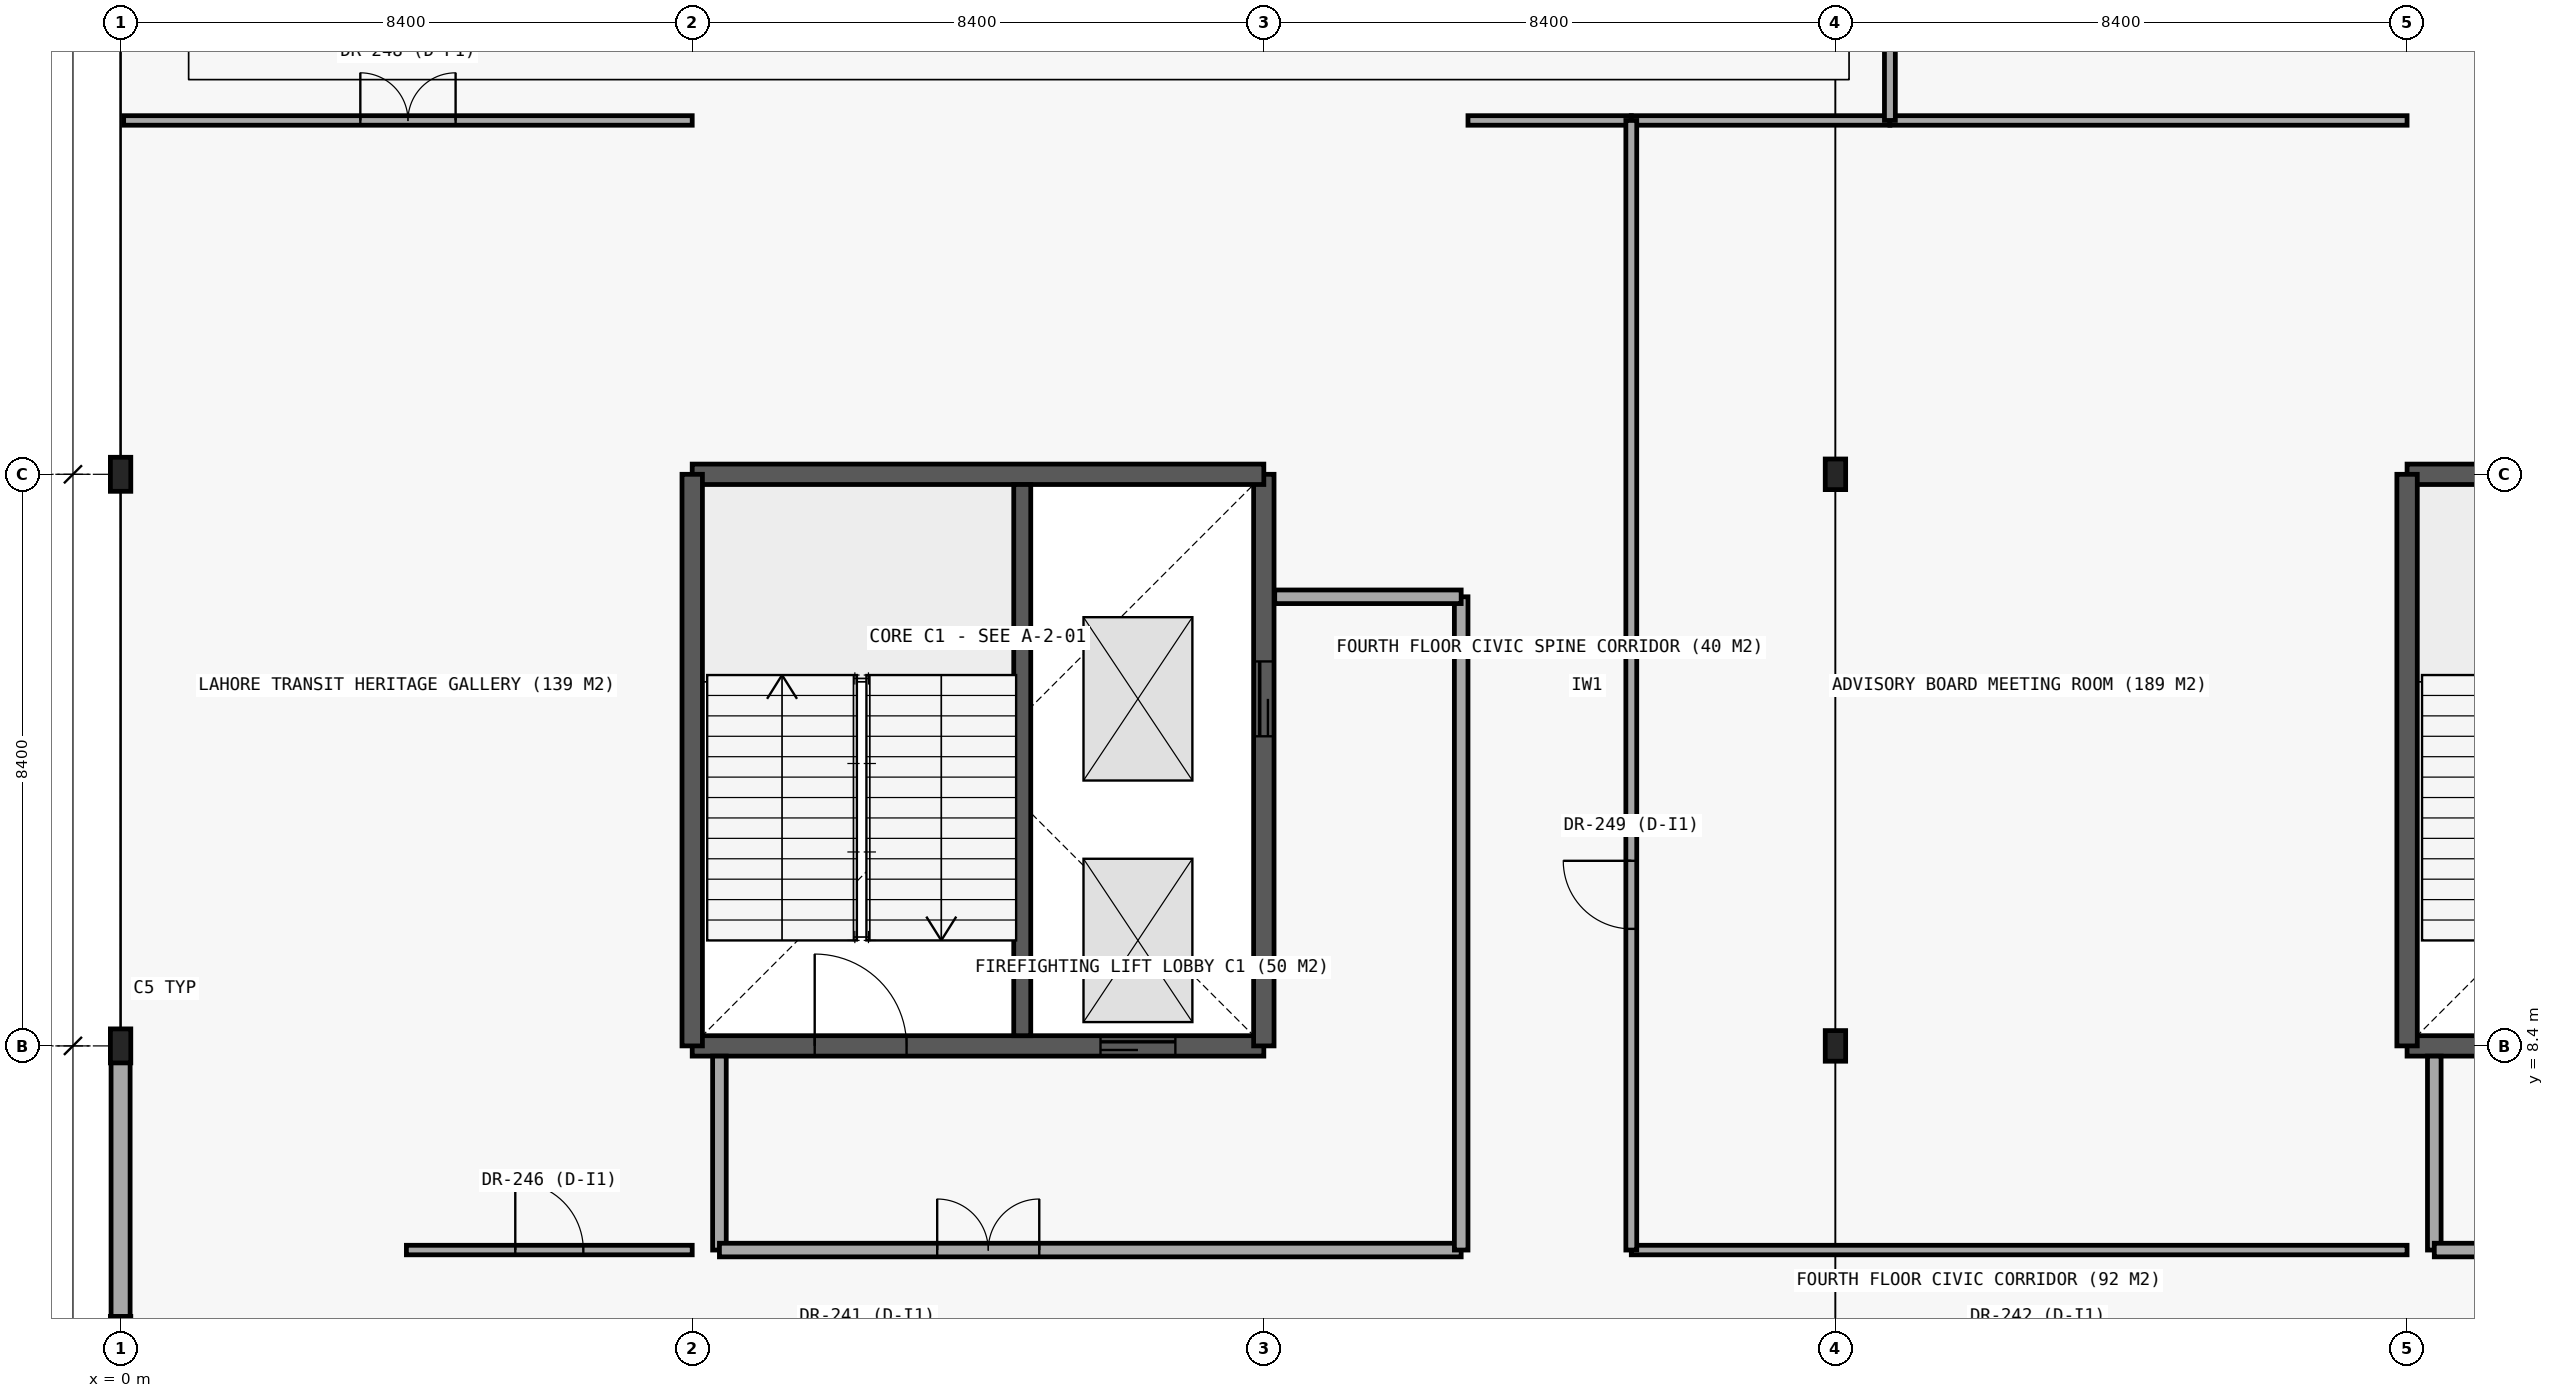
"""IFC4 building model, lengths in metres.
Left out: names, types, materials, properties, quantities, classifications, styles, units other than length and angle.
Written with IfcOpenShell. Run it as: python <this file> out.ifc"""

import sys

from ifc_helpers import new_model, si_unit, direction, frame, frame_2d, origin, origin_2d, place, context, subcontext, project, spatial, rectangle, i_section, extrude, element, fill, save


model = new_model("IFC4")
c1 = context("Model", 3, precision=1e-05, world=origin(), true_north=direction((0.0, 1.0)))
c2 = subcontext(c1, "Body", "Model", "MODEL_VIEW")
j1 = project(units=[si_unit("LENGTHUNIT", "METRE"), si_unit("PLANEANGLEUNIT", "RADIAN")], contexts=[c1])
p1 = place(None, origin())
s1 = spatial("IfcSite", under=j1, at=p1, CompositionType="ELEMENT")
p2 = place(p1, origin())
s2 = spatial("IfcBuilding", under=s1, at=p2, CompositionType="ELEMENT")
p3 = place(p2, frame((0.0, 0.0, 17.4)))
s3 = spatial("IfcBuildingStorey", under=s2, at=p3, CompositionType="ELEMENT", Elevation=17.4)
p4 = place(p3, frame((8.4, 8.4, 0.0), z_axis=(0.0, 0.0, 1.0), x_axis=(1.0, 0.0, 0.0)))
e1 = element("IfcWall", 1, at=p4, inside=s3, PredefinedType="SHEAR", context=c2, shape_type="SweptSolid", body=[
    extrude(rectangle(XDim=8.4, YDim=0.3, at=frame_2d((4.2, 0.0))), origin(), (0.0, 0.0, 1.0), 4.2),
])
p5 = place(p4, frame((1.8, 0.0, 0.0)))
e2 = element("IfcOpeningElement", 2, at=p5, cuts=e1, PredefinedType="OPENING", context=c2, shape_type="SweptSolid", body=[
    extrude(rectangle(XDim=1.35, YDim=2.2, at=frame_2d((0.675, 1.1))), frame((0.0, 0.16, 0.0), z_axis=(0.0, -1.0, 0.0), x_axis=(1.0, 0.0, 0.0)), (0.0, 0.0, 1.0), 0.32),
])
p6 = place(p4, frame((6.0, 0.0, 0.0)))
e3 = element("IfcOpeningElement", 3, at=p6, cuts=e1, PredefinedType="OPENING", context=c2, shape_type="SweptSolid", body=[
    extrude(rectangle(XDim=1.1, YDim=2.2, at=frame_2d((0.55, 1.1))), frame((0.0, 0.16, 0.0), z_axis=(0.0, -1.0, 0.0), x_axis=(1.0, 0.0, 0.0)), (0.0, 0.0, 1.0), 0.32),
])
p7 = place(p3, frame((16.8, 8.4, 0.0), z_axis=(0.0, 0.0, 1.0), x_axis=(0.0, 1.0, 0.0)))
e4 = element("IfcWall", 4, at=p7, inside=s3, PredefinedType="SHEAR", context=c2, shape_type="SweptSolid", body=[
    extrude(rectangle(XDim=8.4, YDim=0.3, at=frame_2d((4.2, 0.0))), origin(), (0.0, 0.0, 1.0), 4.2),
])
p8 = place(p7, frame((4.55, 0.0, 0.0)))
e5 = element("IfcOpeningElement", 5, at=p8, cuts=e4, PredefinedType="OPENING", context=c2, shape_type="SweptSolid", body=[
    extrude(rectangle(XDim=1.1, YDim=2.2, at=frame_2d((0.55, 1.1))), frame((0.0, 0.16, 0.0), z_axis=(0.0, -1.0, 0.0), x_axis=(1.0, 0.0, 0.0)), (0.0, 0.0, 1.0), 0.32),
])
for number, where, z_axis, x_axis in (
    (6, (16.8, 16.8, 0.0), (0.0, 0.0, 1.0), (-1.0, 0.0, 0.0)),
    (7, (8.4, 16.8, 0.0), (0.0, 0.0, 1.0), (0.0, -1.0, 0.0)),
):
    element("IfcWall", number, at=place(p3, frame(where, z_axis=z_axis, x_axis=x_axis)), inside=s3, PredefinedType="SHEAR", context=c2, shape_type="SweptSolid", body=[
        extrude(rectangle(XDim=8.4, YDim=0.3, at=frame_2d((4.2, 0.0))), origin(), (0.0, 0.0, 1.0), 4.2),
    ])
p9 = place(p3, frame((13.25, 8.55, 0.0), z_axis=(0.0, 0.0, 1.0), x_axis=(0.0, 1.0, 0.0)))
e8 = element("IfcWall", 8, at=p9, inside=s3, PredefinedType="SHEAR", context=c2, shape_type="SweptSolid", body=[
    extrude(rectangle(XDim=8.1, YDim=0.25, at=frame_2d((4.05, 0.0))), origin(), (0.0, 0.0, 1.0), 4.2),
])
p10 = place(p3, frame((33.6, 8.4, 0.0), z_axis=(0.0, 0.0, 1.0), x_axis=(1.0, 0.0, 0.0)))
e9 = element("IfcWall", 9, at=p10, inside=s3, PredefinedType="SHEAR", context=c2, shape_type="SweptSolid", body=[
    extrude(rectangle(XDim=8.4, YDim=0.3, at=frame_2d((4.2, 0.0))), origin(), (0.0, 0.0, 1.0), 4.2),
])
p11 = place(p10, frame((1.8, 0.0, 0.0)))
e10 = element("IfcOpeningElement", 10, at=p11, cuts=e9, PredefinedType="OPENING", context=c2, shape_type="SweptSolid", body=[
    extrude(rectangle(XDim=1.35, YDim=2.2, at=frame_2d((0.675, 1.1))), frame((0.0, 0.16, 0.0), z_axis=(0.0, -1.0, 0.0), x_axis=(1.0, 0.0, 0.0)), (0.0, 0.0, 1.0), 0.32),
])
p12 = place(p10, frame((6.0, 0.0, 0.0)))
e11 = element("IfcOpeningElement", 11, at=p12, cuts=e9, PredefinedType="OPENING", context=c2, shape_type="SweptSolid", body=[
    extrude(rectangle(XDim=1.1, YDim=2.2, at=frame_2d((0.55, 1.1))), frame((0.0, 0.16, 0.0), z_axis=(0.0, -1.0, 0.0), x_axis=(1.0, 0.0, 0.0)), (0.0, 0.0, 1.0), 0.32),
])
p13 = place(p3, frame((42.0, 16.8, 0.0), z_axis=(0.0, 0.0, 1.0), x_axis=(-1.0, 0.0, 0.0)))
e12 = element("IfcWall", 12, at=p13, inside=s3, PredefinedType="SHEAR", context=c2, shape_type="SweptSolid", body=[
    extrude(rectangle(XDim=8.4, YDim=0.3, at=frame_2d((4.2, 0.0))), origin(), (0.0, 0.0, 1.0), 4.2),
])
p14 = place(p3, frame((33.6, 16.8, 0.0), z_axis=(0.0, 0.0, 1.0), x_axis=(0.0, -1.0, 0.0)))
e13 = element("IfcWall", 13, at=p14, inside=s3, PredefinedType="SHEAR", context=c2, shape_type="SweptSolid", body=[
    extrude(rectangle(XDim=8.4, YDim=0.3, at=frame_2d((4.2, 0.0))), origin(), (0.0, 0.0, 1.0), 4.2),
])
for number, where, z_axis, x_axis in (
    (14, (0.0, 8.4, 0.0), (0.0, 0.0, 1.0), (1.0, 0.0, 0.0)),
    (15, (0.0, 16.8, 0.0), (0.0, 0.0, 1.0), (1.0, 0.0, 0.0)),
):
    element("IfcColumn", number, at=place(p3, frame(where, z_axis=z_axis, x_axis=x_axis)), inside=s3, PredefinedType="COLUMN", context=c2, shape_type="SweptSolid", body=[
        extrude(i_section(OverallWidth=0.3, OverallDepth=0.5, WebThickness=0.014, FlangeThickness=0.028, FilletRadius=0.027, at=origin_2d()), origin(), (0.0, 0.0, 1.0), 4.2),
    ])
for number, where, z_axis, x_axis in (
    (16, (25.2, 8.4, 0.0), (0.0, 0.0, 1.0), (1.0, 0.0, 0.0)),
    (17, (25.2, 16.8, 0.0), (0.0, 0.0, 1.0), (1.0, 0.0, 0.0)),
    (18, (0.0, 4.2, 0.0), (0.0, 0.0, 1.0), (1.0, 0.0, 0.0)),
):
    element("IfcColumn", number, at=place(p3, frame(where, z_axis=z_axis, x_axis=x_axis)), inside=s3, PredefinedType="COLUMN", context=c2, shape_type="SweptSolid", body=[
        extrude(i_section(OverallWidth=0.3, OverallDepth=0.45, WebThickness=0.014, FlangeThickness=0.026, FilletRadius=0.027, at=origin_2d()), origin(), (0.0, 0.0, 1.0), 4.2),
    ])
p15 = place(p3, frame((0.0, 8.4, 0.0), z_axis=(0.0, 0.0, 1.0), x_axis=(0.0, -1.0, 0.0)))
e19 = element("IfcWall", 19, at=p15, inside=s3, PredefinedType="STANDARD", context=c2, shape_type="SweptSolid", body=[
    extrude(rectangle(XDim=4.2, YDim=0.28, at=frame_2d((2.1, 0.0))), origin(), (0.0, 0.0, 1.0), 3.62),
])
p16 = place(p3, frame((8.8, 5.4, 0.0), z_axis=(0.0, 0.0, 1.0), x_axis=(0.0, 1.0, 0.0)))
e20 = element("IfcWall", 20, at=p16, inside=s3, PredefinedType="PARTITIONING", context=c2, shape_type="SweptSolid", body=[
    extrude(rectangle(XDim=2.85, YDim=0.2, at=frame_2d((1.425, 0.0))), origin(), (0.0, 0.0, 1.0), 3.52),
])
p17 = place(p3, frame((8.8, 5.4, 0.0), z_axis=(0.0, 0.0, 1.0), x_axis=(1.0, 0.0, 0.0)))
e21 = element("IfcWall", 21, at=p17, inside=s3, PredefinedType="PARTITIONING", context=c2, shape_type="SweptSolid", body=[
    extrude(rectangle(XDim=10.9, YDim=0.2, at=frame_2d((5.45, 0.0))), origin(), (0.0, 0.0, 1.0), 3.52),
])
p18 = place(p17, frame((3.2, 0.0, 0.0)))
e22 = element("IfcOpeningElement", 22, at=p18, cuts=e21, PredefinedType="OPENING", context=c2, shape_type="SweptSolid", body=[
    extrude(rectangle(XDim=1.5, YDim=2.2, at=frame_2d((0.75, 1.1))), frame((0.0, 0.11, 0.0), z_axis=(0.0, -1.0, 0.0), x_axis=(1.0, 0.0, 0.0)), (0.0, 0.0, 1.0), 0.22),
])
p19 = place(p3, frame((19.7, 5.4, 0.0), z_axis=(0.0, 0.0, 1.0), x_axis=(0.0, 1.0, 0.0)))
e23 = element("IfcWall", 23, at=p19, inside=s3, PredefinedType="PARTITIONING", context=c2, shape_type="SweptSolid", body=[
    extrude(rectangle(XDim=9.6, YDim=0.2, at=frame_2d((4.8, 0.0))), origin(), (0.0, 0.0, 1.0), 3.52),
])
p20 = place(p3, frame((16.96, 15.0, 0.0), z_axis=(0.0, 0.0, 1.0), x_axis=(1.0, 0.0, 0.0)))
e24 = element("IfcWall", 24, at=p20, inside=s3, PredefinedType="PARTITIONING", context=c2, shape_type="SweptSolid", body=[
    extrude(rectangle(XDim=2.74, YDim=0.2, at=frame_2d((1.37, 0.0))), origin(), (0.0, 0.0, 1.0), 3.52),
])
p21 = place(p3, frame((34.0, 5.4, 0.0), z_axis=(0.0, 0.0, 1.0), x_axis=(0.0, 1.0, 0.0)))
e25 = element("IfcWall", 25, at=p21, inside=s3, PredefinedType="PARTITIONING", context=c2, shape_type="SweptSolid", body=[
    extrude(rectangle(XDim=2.85, YDim=0.2, at=frame_2d((1.425, 0.0))), origin(), (0.0, 0.0, 1.0), 3.49),
])
p22 = place(p3, frame((34.0, 5.4, 0.0), z_axis=(0.0, 0.0, 1.0), x_axis=(1.0, 0.0, 0.0)))
e26 = element("IfcWall", 26, at=p22, inside=s3, PredefinedType="PARTITIONING", context=c2, shape_type="SweptSolid", body=[
    extrude(rectangle(XDim=7.6, YDim=0.2, at=frame_2d((3.8, 0.0))), origin(), (0.0, 0.0, 1.0), 3.52),
])
p23 = place(p22, frame((3.05, 0.0, 0.0)))
e27 = element("IfcOpeningElement", 27, at=p23, cuts=e26, PredefinedType="OPENING", context=c2, shape_type="SweptSolid", body=[
    extrude(rectangle(XDim=1.5, YDim=2.2, at=frame_2d((0.75, 1.1))), frame((0.0, 0.11, 0.0), z_axis=(0.0, -1.0, 0.0), x_axis=(1.0, 0.0, 0.0)), (0.0, 0.0, 1.0), 0.22),
])
p24 = place(p3, frame((4.2, 5.4, 0.0), z_axis=(0.0, 0.0, 1.0), x_axis=(1.0, 0.0, 0.0)))
e28 = element("IfcWall", 28, at=p24, inside=s3, PredefinedType="PARTITIONING", context=c2, shape_type="SweptSolid", body=[
    extrude(rectangle(XDim=4.2, YDim=0.14, at=frame_2d((2.1, 0.0))), origin(), (0.0, 0.0, 1.0), 3.5),
])
p25 = place(p24, frame((1.6, 0.0, 0.0)))
e29 = element("IfcOpeningElement", 29, at=p25, cuts=e28, PredefinedType="OPENING", context=c2, shape_type="SweptSolid", body=[
    extrude(rectangle(XDim=1.0, YDim=2.15, at=frame_2d((0.5, 1.075))), frame((0.0, 0.08, 0.0), z_axis=(0.0, -1.0, 0.0), x_axis=(1.0, 0.0, 0.0)), (0.0, 0.0, 1.0), 0.16),
])
p26 = place(p3, frame((22.2, 5.4, 0.0), z_axis=(0.0, 0.0, 1.0), x_axis=(1.0, 0.0, 0.0)))
e30 = element("IfcWall", 30, at=p26, inside=s3, PredefinedType="PARTITIONING", context=c2, shape_type="SweptSolid", body=[
    extrude(rectangle(XDim=11.4, YDim=0.14, at=frame_2d((5.7, 0.0))), origin(), (0.0, 0.0, 1.0), 3.5),
])
p27 = place(p3, frame((0.045, 22.0, 0.0), z_axis=(0.0, 0.0, 1.0), x_axis=(1.0, 0.0, 0.0)))
e31 = element("IfcWall", 31, at=p27, inside=s3, PredefinedType="PARTITIONING", context=c2, shape_type="SweptSolid", body=[
    extrude(rectangle(XDim=8.355, YDim=0.14, at=frame_2d((4.177, 0.0))), origin(), (0.0, 0.0, 1.0), 3.5),
])
p28 = place(p27, frame((3.478, 0.0, 0.0)))
e32 = element("IfcOpeningElement", 32, at=p28, cuts=e31, PredefinedType="OPENING", context=c2, shape_type="SweptSolid", body=[
    extrude(rectangle(XDim=1.4, YDim=2.25, at=frame_2d((0.7, 1.125))), frame((0.0, 0.08, 0.0), z_axis=(0.0, -1.0, 0.0), x_axis=(1.0, 0.0, 0.0)), (0.0, 0.0, 1.0), 0.16),
])
p29 = place(p3, frame((19.8, 22.0, 0.0), z_axis=(0.0, 0.0, 1.0), x_axis=(1.0, 0.0, 0.0)))
e33 = element("IfcWall", 33, at=p29, inside=s3, PredefinedType="PARTITIONING", context=c2, shape_type="SweptSolid", body=[
    extrude(rectangle(XDim=2.4, YDim=0.14, at=frame_2d((1.2, 0.0))), origin(), (0.0, 0.0, 1.0), 3.5),
])
p30 = place(p3, frame((22.2, 22.0, 0.0), z_axis=(0.0, 0.0, 1.0), x_axis=(1.0, 0.0, 0.0)))
e34 = element("IfcWall", 34, at=p30, inside=s3, PredefinedType="PARTITIONING", context=c2, shape_type="SweptSolid", body=[
    extrude(rectangle(XDim=3.8, YDim=0.14, at=frame_2d((1.9, 0.0))), origin(), (0.0, 0.0, 1.0), 3.5),
])
p31 = place(p3, frame((26.0, 22.0, 0.0), z_axis=(0.0, 0.0, 1.0), x_axis=(1.0, 0.0, 0.0)))
e35 = element("IfcWall", 35, at=p31, inside=s3, PredefinedType="PARTITIONING", context=c2, shape_type="SweptSolid", body=[
    extrude(rectangle(XDim=7.6, YDim=0.14, at=frame_2d((3.8, 0.0))), origin(), (0.0, 0.0, 1.0), 3.5),
])
p32 = place(p3, frame((22.2, 5.4, 0.0), z_axis=(0.0, 0.0, 1.0), x_axis=(0.0, 1.0, 0.0)))
e36 = element("IfcWall", 36, at=p32, inside=s3, PredefinedType="PARTITIONING", context=c2, shape_type="SweptSolid", body=[
    extrude(rectangle(XDim=16.6, YDim=0.16, at=frame_2d((8.3, 0.0))), origin(), (0.0, 0.0, 1.0), 3.5),
])
p33 = place(p32, frame((4.72, 0.0, 0.0)))
e37 = element("IfcOpeningElement", 37, at=p33, cuts=e36, PredefinedType="OPENING", context=c2, shape_type="SweptSolid", body=[
    extrude(rectangle(XDim=1.0, YDim=2.15, at=frame_2d((0.5, 1.075))), frame((0.0, 0.09, 0.0), z_axis=(0.0, -1.0, 0.0), x_axis=(1.0, 0.0, 0.0)), (0.0, 0.0, 1.0), 0.18),
])
p34 = place(p3, frame((26.0, 22.0, 0.0), z_axis=(0.0, 0.0, 1.0), x_axis=(0.0, 1.0, 0.0)))
e38 = element("IfcWall", 38, at=p34, inside=s3, PredefinedType="PARTITIONING", context=c2, shape_type="SweptSolid", body=[
    extrude(rectangle(XDim=19.855, YDim=0.16, at=frame_2d((9.927, 0.0))), origin(), (0.0, 0.0, 1.0), 3.5),
])
p35 = place(p34, frame((5.07, 0.0, 0.0)))
e39 = element("IfcOpeningElement", 39, at=p35, cuts=e38, PredefinedType="OPENING", context=c2, shape_type="SweptSolid", body=[
    extrude(rectangle(XDim=1.4, YDim=2.25, at=frame_2d((0.7, 1.125))), frame((0.0, 0.09, 0.0), z_axis=(0.0, -1.0, 0.0), x_axis=(1.0, 0.0, 0.0)), (0.0, 0.0, 1.0), 0.18),
])
p36 = place(p5, origin())
e40 = element("IfcDoor", 40, at=p36, inside=s3, OperationType="SINGLE_SWING_LEFT", PredefinedType="DOOR", context=c2, shape_type="SweptSolid", body=[
    extrude(rectangle(XDim=1.35, YDim=2.2, at=frame_2d((0.675, 1.1))), frame((0.0, 0.025, 0.0), z_axis=(0.0, -1.0, 0.0), x_axis=(1.0, 0.0, 0.0)), (0.0, 0.0, 1.0), 0.05),
])
fill(e2, e40)
p37 = place(p6, origin())
e41 = element("IfcDoor", 41, at=p37, inside=s3, OperationType="SLIDING_TO_LEFT", PredefinedType="DOOR", context=c2, shape_type="SweptSolid", body=[
    extrude(rectangle(XDim=1.1, YDim=2.2, at=frame_2d((0.55, 1.1))), frame((0.0, 0.025, 0.0), z_axis=(0.0, -1.0, 0.0), x_axis=(1.0, 0.0, 0.0)), (0.0, 0.0, 1.0), 0.05),
])
fill(e3, e41)
p38 = place(p8, origin())
e42 = element("IfcDoor", 42, at=p38, inside=s3, OperationType="SLIDING_TO_RIGHT", PredefinedType="DOOR", context=c2, shape_type="SweptSolid", body=[
    extrude(rectangle(XDim=1.1, YDim=2.2, at=frame_2d((0.55, 1.1))), frame((0.0, 0.025, 0.0), z_axis=(0.0, -1.0, 0.0), x_axis=(1.0, 0.0, 0.0)), (0.0, 0.0, 1.0), 0.05),
])
fill(e5, e42)
p39 = place(p18, origin())
e43 = element("IfcDoor", 43, at=p39, inside=s3, OperationType="DOUBLE_DOOR_SINGLE_SWING", PredefinedType="DOOR", context=c2, shape_type="SweptSolid", body=[
    extrude(rectangle(XDim=1.5, YDim=2.2, at=frame_2d((0.75, 1.1))), frame((0.0, 0.025, 0.0), z_axis=(0.0, -1.0, 0.0), x_axis=(1.0, 0.0, 0.0)), (0.0, 0.0, 1.0), 0.05),
])
fill(e22, e43)
p40 = place(p25, origin())
e44 = element("IfcDoor", 44, at=p40, inside=s3, OperationType="SINGLE_SWING_LEFT", PredefinedType="DOOR", context=c2, shape_type="SweptSolid", body=[
    extrude(rectangle(XDim=1.0, YDim=2.15, at=frame_2d((0.5, 1.075))), frame((0.0, 0.025, 0.0), z_axis=(0.0, -1.0, 0.0), x_axis=(1.0, 0.0, 0.0)), (0.0, 0.0, 1.0), 0.05),
])
fill(e29, e44)
p41 = place(p28, origin())
e45 = element("IfcDoor", 45, at=p41, inside=s3, OperationType="DOUBLE_DOOR_SINGLE_SWING", PredefinedType="DOOR", context=c2, shape_type="SweptSolid", body=[
    extrude(rectangle(XDim=1.4, YDim=2.25, at=frame_2d((0.7, 1.125))), frame((0.0, 0.025, 0.0), z_axis=(0.0, -1.0, 0.0), x_axis=(1.0, 0.0, 0.0)), (0.0, 0.0, 1.0), 0.05),
])
fill(e32, e45)
p42 = place(p33, origin())
e46 = element("IfcDoor", 46, at=p42, inside=s3, OperationType="SINGLE_SWING_RIGHT", PredefinedType="DOOR", context=c2, shape_type="SweptSolid", body=[
    extrude(rectangle(XDim=1.0, YDim=2.15, at=frame_2d((0.5, 1.075))), frame((0.0, 0.025, 0.0), z_axis=(0.0, -1.0, 0.0), x_axis=(1.0, 0.0, 0.0)), (0.0, 0.0, 1.0), 0.05),
])
fill(e37, e46)
save(model, sys.argv[1])
